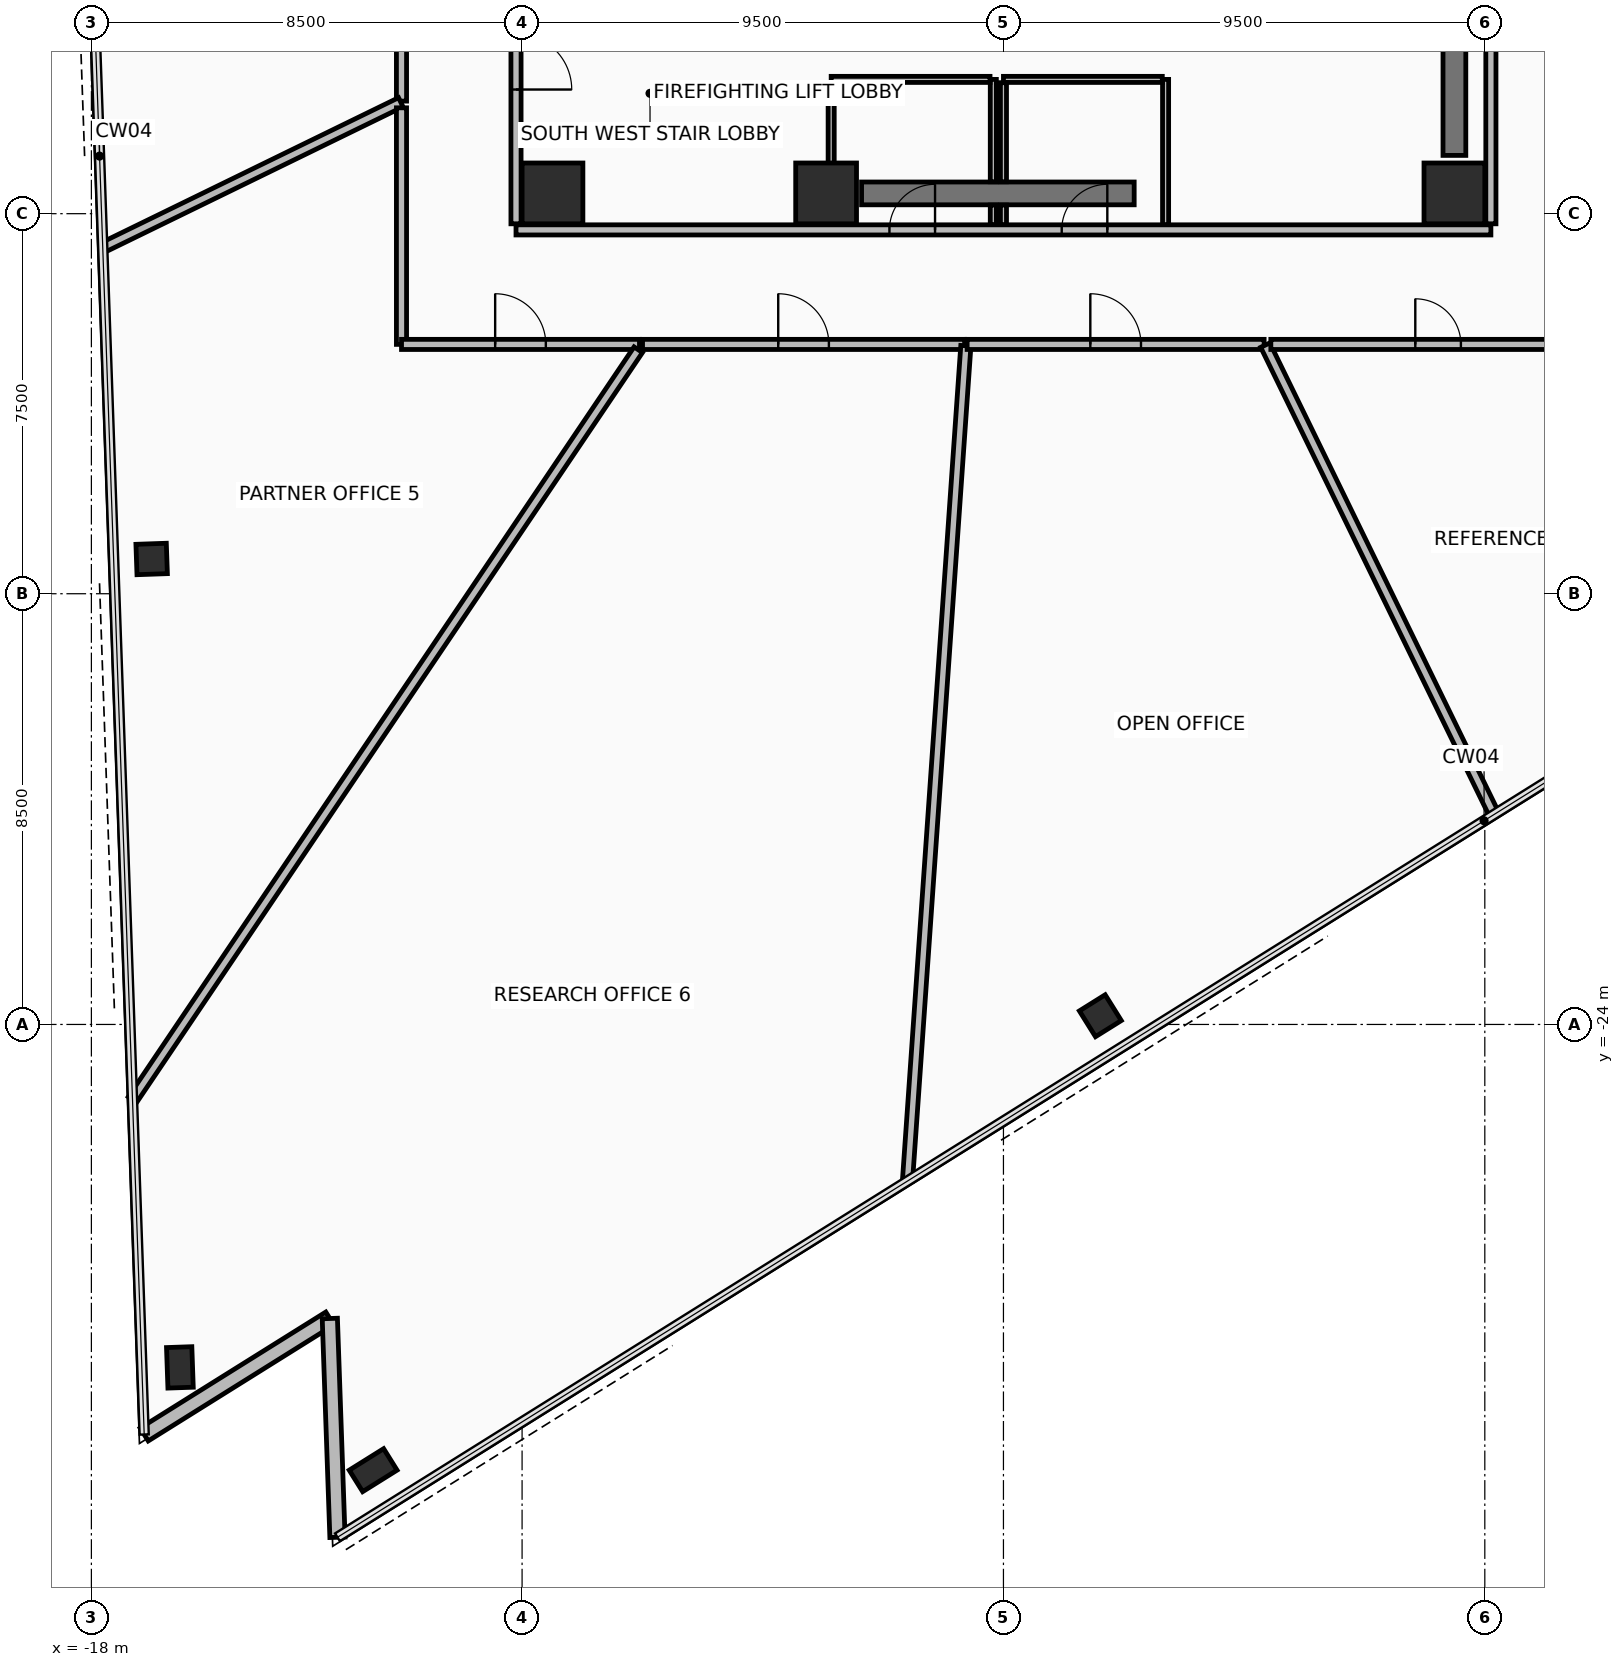
"""IFC4 building model, lengths in metres.
Left out: names, types, materials, properties, quantities, classifications, styles, units other than length and angle.
Written with IfcOpenShell. Run it as: python <this file> out.ifc"""

import sys

from ifc_helpers import new_model, si_unit, direction, frame, frame_2d, origin, origin_2d, place, context, subcontext, project, spatial, rectangle, hollow_rectangle, extrude, element, fill, save


model = new_model("IFC4")
c1 = context("Model", 3, precision=1e-05, world=origin(), true_north=direction((0.0, 1.0)))
c2 = subcontext(c1, "Body", "Model", "MODEL_VIEW")
j1 = project(units=[si_unit("LENGTHUNIT", "METRE"), si_unit("PLANEANGLEUNIT", "RADIAN")], contexts=[c1])
p1 = place(None, origin())
s1 = spatial("IfcSite", under=j1, at=p1, CompositionType="ELEMENT")
p2 = place(p1, origin())
s2 = spatial("IfcBuilding", under=s1, at=p2, CompositionType="ELEMENT")
p3 = place(p2, frame((0.0, 0.0, 149.6)))
s3 = spatial("IfcBuildingStorey", under=s2, at=p3, CompositionType="ELEMENT", Elevation=149.6)
for number, where, z_axis, x_axis in (
    (1, (-8.9, -7.6, 0.0), (0.0, 0.0, 1.0), (1.0, 0.0, 0.0)),
    (2, (-3.5, -7.6, 0.0), (0.0, 0.0, 1.0), (1.0, 0.0, 0.0)),
    (3, (8.9, -7.6, 0.0), (0.0, 0.0, 1.0), (1.0, 0.0, 0.0)),
):
    element("IfcColumn", number, at=place(p3, frame(where, z_axis=z_axis, x_axis=x_axis)), inside=s3, PredefinedType="COLUMN", context=c2, shape_type="SweptSolid", body=[
        extrude(rectangle(XDim=1.2, YDim=1.2, at=origin_2d()), origin(), (0.0, 0.0, 1.0), 3.6),
    ])
p4 = place(p3, frame((-16.811, -14.814, 0.0), z_axis=(0.0, 0.0, 1.0), x_axis=(-0.034899496703, 0.999390827019, 0.0)))
e4 = element("IfcColumn", 4, at=p4, inside=s3, PredefinedType="COLUMN", context=c2, shape_type="SweptSolid", body=[
    extrude(hollow_rectangle(XDim=0.6, YDim=0.6, WallThickness=0.036, at=origin_2d()), origin(), (0.0, 0.0, 1.0), 3.6),
])
for number, where, z_axis, x_axis in (
    (5, (-16.254, -30.768, 0.0), (0.0, 0.0, 1.0), (-0.035, 0.999, 0.0)),
    (6, (-12.439, -32.796, 0.0), (0.0, 0.0, 1.0), (0.848, 0.53, 0.0)),
):
    element("IfcColumn", number, at=place(p3, frame(where, z_axis=z_axis, x_axis=x_axis)), inside=s3, PredefinedType="COLUMN", context=c2, shape_type="SweptSolid", body=[
        extrude(hollow_rectangle(XDim=0.5, YDim=0.8, WallThickness=0.04, at=origin_2d()), origin(), (0.0, 0.0, 1.0), 3.6),
    ])
p5 = place(p3, frame((1.912, -23.828, 0.0), z_axis=(0.0, 0.0, 1.0), x_axis=(0.848047171272, 0.529920744356, 0.0)))
e7 = element("IfcColumn", 7, at=p5, inside=s3, PredefinedType="COLUMN", context=c2, shape_type="SweptSolid", body=[
    extrude(hollow_rectangle(XDim=0.6, YDim=0.6, WallThickness=0.036, at=origin_2d()), origin(), (0.0, 0.0, 1.0), 3.6),
])
p6 = place(p3, frame((-16.958, -32.092, 0.0), z_axis=(0.0, 0.0, 1.0), x_axis=(0.848068146975, 0.529887174866, 0.0)))
e8 = element("IfcWall", 8, at=p6, inside=s3, PredefinedType="STANDARD", context=c2, shape_type="SweptSolid", body=[
    extrude(rectangle(XDim=4.32, YDim=0.3, at=frame_2d((2.16, 0.0))), origin(), (0.0, 0.0, 1.0), 2.705),
])
p7 = place(p3, frame((-13.294, -29.803, 0.0), z_axis=(0.0, 0.0, 1.0), x_axis=(0.034869079132, -0.999391888761, 0.0)))
e9 = element("IfcWall", 9, at=p7, inside=s3, PredefinedType="STANDARD", context=c2, shape_type="SweptSolid", body=[
    extrude(rectangle(XDim=4.32, YDim=0.3, at=frame_2d((2.16, 0.0))), origin(), (0.0, 0.0, 1.0), 2.705),
])
p8 = place(p3, frame((-2.8, -7.6, 0.0), z_axis=(0.0, 0.0, 1.0), x_axis=(1.0, 0.0, 0.0)))
e10 = element("IfcWall", 10, at=p8, inside=s3, PredefinedType="SHEAR", context=c2, shape_type="SweptSolid", body=[
    extrude(rectangle(XDim=5.38, YDim=0.45, at=frame_2d((2.69, 0.0))), origin(), (0.0, 0.0, 1.0), 3.41),
])
p9 = place(p3, frame((8.9, -6.85, 0.0), z_axis=(0.0, 0.0, 1.0), x_axis=(0.0, 1.0, 0.0)))
e11 = element("IfcWall", 11, at=p9, inside=s3, PredefinedType="SHEAR", context=c2, shape_type="SweptSolid", body=[
    extrude(rectangle(XDim=10.7, YDim=0.45, at=frame_2d((5.35, 0.0))), origin(), (0.0, 0.0, 1.0), 3.41),
])
p10 = place(p3, frame((-9.62, -8.32, 0.0), z_axis=(0.0, 0.0, 1.0), x_axis=(1.0, 0.0, 0.0)))
e12 = element("IfcWall", 12, at=p10, inside=s3, PredefinedType="PARTITIONING", context=c2, shape_type="SweptSolid", body=[
    extrude(rectangle(XDim=19.24, YDim=0.2, at=frame_2d((9.62, 0.0))), origin(), (0.0, 0.0, 1.0), 2.855),
])
p11 = place(p10, frame((7.37, 0.0, 0.0)))
e13 = element("IfcOpeningElement", 13, at=p11, cuts=e12, PredefinedType="OPENING", context=c2, shape_type="SweptSolid", body=[
    extrude(rectangle(XDim=0.9, YDim=2.1, at=frame_2d((0.45, 1.05))), frame((0.0, 0.11, 0.0), z_axis=(0.0, -1.0, 0.0), x_axis=(1.0, 0.0, 0.0)), (0.0, 0.0, 1.0), 0.22),
])
p12 = place(p10, frame((10.77, 0.0, 0.0)))
e14 = element("IfcOpeningElement", 14, at=p12, cuts=e12, PredefinedType="OPENING", context=c2, shape_type="SweptSolid", body=[
    extrude(rectangle(XDim=0.9, YDim=2.1, at=frame_2d((0.45, 1.05))), frame((0.0, 0.11, 0.0), z_axis=(0.0, -1.0, 0.0), x_axis=(1.0, 0.0, 0.0)), (0.0, 0.0, 1.0), 0.22),
])
p13 = place(p3, frame((-9.62, 8.2, 0.0), z_axis=(0.0, 0.0, 1.0), x_axis=(0.0, -1.0, 0.0)))
e15 = element("IfcWall", 15, at=p13, inside=s3, PredefinedType="PARTITIONING", context=c2, shape_type="SweptSolid", body=[
    extrude(rectangle(XDim=16.4, YDim=0.2, at=frame_2d((8.2, 0.0))), origin(), (0.0, 0.0, 1.0), 2.855),
])
p14 = place(p13, frame((12.65, 0.0, 0.0)))
e16 = element("IfcOpeningElement", 16, at=p14, cuts=e15, PredefinedType="OPENING", context=c2, shape_type="SweptSolid", body=[
    extrude(rectangle(XDim=1.1, YDim=2.15, at=frame_2d((0.55, 1.075))), frame((0.0, 0.11, 0.0), z_axis=(0.0, -1.0, 0.0), x_axis=(1.0, 0.0, 0.0)), (0.0, 0.0, 1.0), 0.22),
])
p15 = place(p3, frame((9.62, -8.2, 0.0), z_axis=(0.0, 0.0, 1.0), x_axis=(0.0, 1.0, 0.0)))
e17 = element("IfcWall", 17, at=p15, inside=s3, PredefinedType="PARTITIONING", context=c2, shape_type="SweptSolid", body=[
    extrude(rectangle(XDim=16.4, YDim=0.2, at=frame_2d((8.2, 0.0))), origin(), (0.0, 0.0, 1.0), 2.855),
])
p16 = place(p15, frame((12.65, 0.0, 0.0)))
e18 = element("IfcOpeningElement", 18, at=p16, cuts=e17, PredefinedType="OPENING", context=c2, shape_type="SweptSolid", body=[
    extrude(rectangle(XDim=1.1, YDim=2.15, at=frame_2d((0.55, 1.075))), frame((0.0, 0.11, 0.0), z_axis=(0.0, -1.0, 0.0), x_axis=(1.0, 0.0, 0.0)), (0.0, 0.0, 1.0), 0.22),
])
p17 = place(p3, frame((-0.2, -8.215, 0.0), z_axis=(0.0, 0.0, 1.0), x_axis=(0.0, 1.0, 0.0)))
e19 = element("IfcWall", 19, at=p17, inside=s3, PredefinedType="PARTITIONING", context=c2, shape_type="SweptSolid", body=[
    extrude(rectangle(XDim=0.385, YDim=0.12, at=frame_2d((0.192, 0.0))), origin(), (0.0, 0.0, 1.0), 2.605),
])
p18 = place(p3, frame((-0.2, -7.37, 0.0), z_axis=(0.0, 0.0, 1.0), x_axis=(0.0, 1.0, 0.0)))
e20 = element("IfcWall", 20, at=p18, inside=s3, PredefinedType="PARTITIONING", context=c2, shape_type="SweptSolid", body=[
    extrude(rectangle(XDim=2.02, YDim=0.12, at=frame_2d((1.01, 0.0))), origin(), (0.0, 0.0, 1.0), 2.605),
])
p19 = place(p3, frame((-0.265, -5.35, 0.0), z_axis=(0.0, 0.0, 1.0), x_axis=(-1.0, 0.0, 0.0)))
e21 = element("IfcWall", 21, at=p19, inside=s3, PredefinedType="PARTITIONING", context=c2, shape_type="SweptSolid", body=[
    extrude(rectangle(XDim=3.135, YDim=0.12, at=frame_2d((1.567, 0.0))), origin(), (0.0, 0.0, 1.0), 2.605),
])
p20 = place(p3, frame((-3.4, -5.415, 0.0), z_axis=(0.0, 0.0, 1.0), x_axis=(0.0, -1.0, 0.0)))
e22 = element("IfcWall", 22, at=p20, inside=s3, PredefinedType="PARTITIONING", context=c2, shape_type="SweptSolid", body=[
    extrude(rectangle(XDim=2.8, YDim=0.12, at=frame_2d((1.4, 0.0))), origin(), (0.0, 0.0, 1.0), 2.605),
])
p21 = place(p3, frame((3.2, -8.215, 0.0), z_axis=(0.0, 0.0, 1.0), x_axis=(0.0, 1.0, 0.0)))
e23 = element("IfcWall", 23, at=p21, inside=s3, PredefinedType="PARTITIONING", context=c2, shape_type="SweptSolid", body=[
    extrude(rectangle(XDim=2.865, YDim=0.12, at=frame_2d((1.433, 0.0))), origin(), (0.0, 0.0, 1.0), 2.605),
])
p22 = place(p3, frame((3.135, -5.35, 0.0), z_axis=(0.0, 0.0, 1.0), x_axis=(-1.0, 0.0, 0.0)))
e24 = element("IfcWall", 24, at=p22, inside=s3, PredefinedType="PARTITIONING", context=c2, shape_type="SweptSolid", body=[
    extrude(rectangle(XDim=3.135, YDim=0.12, at=frame_2d((1.567, 0.0))), origin(), (0.0, 0.0, 1.0), 3.41),
])
p23 = place(p3, frame((0.0, -5.415, 0.0), z_axis=(0.0, 0.0, 1.0), x_axis=(0.0, -1.0, 0.0)))
e25 = element("IfcWall", 25, at=p23, inside=s3, PredefinedType="PARTITIONING", context=c2, shape_type="SweptSolid", body=[
    extrude(rectangle(XDim=1.955, YDim=0.12, at=frame_2d((0.978, 0.0))), origin(), (0.0, 0.0, 1.0), 2.605),
])
p24 = place(p3, frame((0.0, -7.83, 0.0), z_axis=(0.0, 0.0, 1.0), x_axis=(0.0, -1.0, 0.0)))
e26 = element("IfcWall", 26, at=p24, inside=s3, PredefinedType="PARTITIONING", context=c2, shape_type="SweptSolid", body=[
    extrude(rectangle(XDim=0.385, YDim=0.12, at=frame_2d((0.192, 0.0))), origin(), (0.0, 0.0, 1.0), 2.605),
])
p25 = place(p3, frame((-11.88, 0.807, 0.0), z_axis=(0.0, 0.0, 1.0), x_axis=(0.0, -1.0, 0.0)))
e27 = element("IfcWall", 27, at=p25, inside=s3, PredefinedType="PARTITIONING", context=c2, shape_type="SweptSolid", body=[
    extrude(rectangle(XDim=6.586, YDim=0.2, at=frame_2d((3.293, 0.0))), origin(), (0.0, 0.0, 1.0), 3.41),
])
p26 = place(p25, frame((2.793, 0.0, 0.0)))
e28 = element("IfcOpeningElement", 28, at=p26, cuts=e27, PredefinedType="OPENING", context=c2, shape_type="SweptSolid", body=[
    extrude(rectangle(XDim=1.0, YDim=2.15, at=frame_2d((0.5, 1.075))), frame((0.0, 0.11, 0.0), z_axis=(0.0, -1.0, 0.0), x_axis=(1.0, 0.0, 0.0)), (0.0, 0.0, 1.0), 0.22),
])
p27 = place(p3, frame((-11.894, -5.801, 0.0), z_axis=(0.0, 0.0, 1.0), x_axis=(-0.89877884349, -0.438402315796, 0.0)))
e29 = element("IfcWall", 29, at=p27, inside=s3, PredefinedType="PARTITIONING", context=c2, shape_type="SweptSolid", body=[
    extrude(rectangle(XDim=6.544, YDim=0.2, at=frame_2d((3.272, 0.0))), origin(), (0.0, 0.0, 1.0), 2.705),
])
p28 = place(p3, frame((-11.88, -5.911, 0.0), z_axis=(0.0, 0.0, 1.0), x_axis=(0.0, -1.0, 0.0)))
e30 = element("IfcWall", 30, at=p28, inside=s3, PredefinedType="PARTITIONING", context=c2, shape_type="SweptSolid", body=[
    extrude(rectangle(XDim=4.668, YDim=0.2, at=frame_2d((2.334, 0.0))), origin(), (0.0, 0.0, 1.0), 2.855),
])
p29 = place(p3, frame((-11.879, -10.58, 0.0), z_axis=(0.0, 0.0, 1.0), x_axis=(1.0, 0.0, 0.0)))
e31 = element("IfcWall", 31, at=p29, inside=s3, PredefinedType="PARTITIONING", context=c2, shape_type="SweptSolid", body=[
    extrude(rectangle(XDim=4.696, YDim=0.2, at=frame_2d((2.348, 0.0))), origin(), (0.0, 0.0, 1.0), 2.855),
])
p30 = place(p29, frame((1.848, 0.0, 0.0)))
e32 = element("IfcOpeningElement", 32, at=p30, cuts=e31, PredefinedType="OPENING", context=c2, shape_type="SweptSolid", body=[
    extrude(rectangle(XDim=1.0, YDim=2.15, at=frame_2d((0.5, 1.075))), frame((0.0, 0.11, 0.0), z_axis=(0.0, -1.0, 0.0), x_axis=(1.0, 0.0, 0.0)), (0.0, 0.0, 1.0), 0.22),
])
p31 = place(p3, frame((-7.207, -10.685, 0.0), z_axis=(0.0, 0.0, 1.0), x_axis=(-0.559208788391, -0.82902685782, 0.0)))
e33 = element("IfcWall", 33, at=p31, inside=s3, PredefinedType="PARTITIONING", context=c2, shape_type="SweptSolid", body=[
    extrude(rectangle(XDim=17.85, YDim=0.2, at=frame_2d((8.925, 0.0))), origin(), (0.0, 0.0, 1.0), 2.705),
])
p32 = place(p3, frame((-7.123, -10.58, 0.0), z_axis=(0.0, 0.0, 1.0), x_axis=(1.0, 0.0, 0.0)))
e34 = element("IfcWall", 34, at=p32, inside=s3, PredefinedType="PARTITIONING", context=c2, shape_type="SweptSolid", body=[
    extrude(rectangle(XDim=6.356, YDim=0.2, at=frame_2d((3.178, 0.0))), origin(), (0.0, 0.0, 1.0), 2.855),
])
p33 = place(p32, frame((2.678, 0.0, 0.0)))
e35 = element("IfcOpeningElement", 35, at=p33, cuts=e34, PredefinedType="OPENING", context=c2, shape_type="SweptSolid", body=[
    extrude(rectangle(XDim=1.0, YDim=2.15, at=frame_2d((0.5, 1.075))), frame((0.0, 0.11, 0.0), z_axis=(0.0, -1.0, 0.0), x_axis=(1.0, 0.0, 0.0)), (0.0, 0.0, 1.0), 0.22),
])
p34 = place(p3, frame((-0.742, -10.607, 0.0), z_axis=(0.0, 0.0, 1.0), x_axis=(-0.069759090617, -0.997563867267, 0.0)))
e36 = element("IfcWall", 36, at=p34, inside=s3, PredefinedType="PARTITIONING", context=c2, shape_type="SweptSolid", body=[
    extrude(rectangle(XDim=16.512, YDim=0.2, at=frame_2d((8.256, 0.0))), origin(), (0.0, 0.0, 1.0), 2.705),
])
p35 = place(p3, frame((-0.717, -10.58, 0.0), z_axis=(0.0, 0.0, 1.0), x_axis=(1.0, 0.0, 0.0)))
e37 = element("IfcWall", 37, at=p35, inside=s3, PredefinedType="PARTITIONING", context=c2, shape_type="SweptSolid", body=[
    extrude(rectangle(XDim=5.861, YDim=0.2, at=frame_2d((2.931, 0.0))), origin(), (0.0, 0.0, 1.0), 3.41),
])
p36 = place(p35, frame((2.431, 0.0, 0.0)))
e38 = element("IfcOpeningElement", 38, at=p36, cuts=e37, PredefinedType="OPENING", context=c2, shape_type="SweptSolid", body=[
    extrude(rectangle(XDim=1.0, YDim=2.15, at=frame_2d((0.5, 1.075))), frame((0.0, 0.11, 0.0), z_axis=(0.0, -1.0, 0.0), x_axis=(1.0, 0.0, 0.0)), (0.0, 0.0, 1.0), 0.22),
])
p37 = place(p3, frame((5.167, -10.594, 0.0), z_axis=(0.0, 0.0, 1.0), x_axis=(0.438378255041, -0.898790579338, 0.0)))
e39 = element("IfcWall", 39, at=p37, inside=s3, PredefinedType="PARTITIONING", context=c2, shape_type="SweptSolid", body=[
    extrude(rectangle(XDim=10.282, YDim=0.2, at=frame_2d((5.141, 0.0))), origin(), (0.0, 0.0, 1.0), 2.705),
])
p38 = place(p3, frame((5.277, -10.58, 0.0), z_axis=(0.0, 0.0, 1.0), x_axis=(1.0, 0.0, 0.0)))
e40 = element("IfcWall", 40, at=p38, inside=s3, PredefinedType="PARTITIONING", context=c2, shape_type="SweptSolid", body=[
    extrude(rectangle(XDim=6.602, YDim=0.2, at=frame_2d((3.301, 0.0))), origin(), (0.0, 0.0, 1.0), 2.855),
])
p39 = place(p38, frame((2.851, 0.0, 0.0)))
e41 = element("IfcOpeningElement", 41, at=p39, cuts=e40, PredefinedType="OPENING", context=c2, shape_type="SweptSolid", body=[
    extrude(rectangle(XDim=0.9, YDim=2.1, at=frame_2d((0.45, 1.05))), frame((0.0, 0.11, 0.0), z_axis=(0.0, -1.0, 0.0), x_axis=(1.0, 0.0, 0.0)), (0.0, 0.0, 1.0), 0.22),
])
p40 = place(p14, frame((1.1, 0.0, 0.0), z_axis=(0.0, 0.0, 1.0), x_axis=(-1.0, 0.0, 0.0)))
e42 = element("IfcDoor", 42, at=p40, inside=s3, OperationType="SINGLE_SWING_LEFT", PredefinedType="DOOR", context=c2, shape_type="SweptSolid", body=[
    extrude(rectangle(XDim=1.1, YDim=2.15, at=frame_2d((0.55, 1.075))), frame((0.0, 0.025, 0.0), z_axis=(0.0, -1.0, 0.0), x_axis=(1.0, 0.0, 0.0)), (0.0, 0.0, 1.0), 0.05),
])
fill(e16, e42)
p41 = place(p11, frame((0.9, 0.0, 0.0), z_axis=(0.0, 0.0, 1.0), x_axis=(-1.0, 0.0, 0.0)))
e43 = element("IfcDoor", 43, at=p41, inside=s3, OperationType="SINGLE_SWING_LEFT", PredefinedType="DOOR", context=c2, shape_type="SweptSolid", body=[
    extrude(rectangle(XDim=0.9, YDim=2.1, at=frame_2d((0.45, 1.05))), frame((0.0, 0.025, 0.0), z_axis=(0.0, -1.0, 0.0), x_axis=(1.0, 0.0, 0.0)), (0.0, 0.0, 1.0), 0.05),
])
fill(e13, e43)
p42 = place(p12, frame((0.9, 0.0, 0.0), z_axis=(0.0, 0.0, 1.0), x_axis=(-1.0, 0.0, 0.0)))
e44 = element("IfcDoor", 44, at=p42, inside=s3, OperationType="SINGLE_SWING_LEFT", PredefinedType="DOOR", context=c2, shape_type="SweptSolid", body=[
    extrude(rectangle(XDim=0.9, YDim=2.1, at=frame_2d((0.45, 1.05))), frame((0.0, 0.025, 0.0), z_axis=(0.0, -1.0, 0.0), x_axis=(1.0, 0.0, 0.0)), (0.0, 0.0, 1.0), 0.05),
])
fill(e14, e44)
p43 = place(p30, origin())
e45 = element("IfcDoor", 45, at=p43, inside=s3, OperationType="SINGLE_SWING_RIGHT", PredefinedType="DOOR", context=c2, shape_type="SweptSolid", body=[
    extrude(rectangle(XDim=1.0, YDim=2.15, at=frame_2d((0.5, 1.075))), frame((0.0, 0.025, 0.0), z_axis=(0.0, -1.0, 0.0), x_axis=(1.0, 0.0, 0.0)), (0.0, 0.0, 1.0), 0.05),
])
fill(e32, e45)
p44 = place(p33, origin())
e46 = element("IfcDoor", 46, at=p44, inside=s3, OperationType="SINGLE_SWING_RIGHT", PredefinedType="DOOR", context=c2, shape_type="SweptSolid", body=[
    extrude(rectangle(XDim=1.0, YDim=2.15, at=frame_2d((0.5, 1.075))), frame((0.0, 0.025, 0.0), z_axis=(0.0, -1.0, 0.0), x_axis=(1.0, 0.0, 0.0)), (0.0, 0.0, 1.0), 0.05),
])
fill(e35, e46)
p45 = place(p36, origin())
e47 = element("IfcDoor", 47, at=p45, inside=s3, OperationType="SINGLE_SWING_RIGHT", PredefinedType="DOOR", context=c2, shape_type="SweptSolid", body=[
    extrude(rectangle(XDim=1.0, YDim=2.15, at=frame_2d((0.5, 1.075))), frame((0.0, 0.025, 0.0), z_axis=(0.0, -1.0, 0.0), x_axis=(1.0, 0.0, 0.0)), (0.0, 0.0, 1.0), 0.05),
])
fill(e38, e47)
p46 = place(p39, origin())
e48 = element("IfcDoor", 48, at=p46, inside=s3, OperationType="SINGLE_SWING_LEFT", PredefinedType="DOOR", context=c2, shape_type="SweptSolid", body=[
    extrude(rectangle(XDim=0.9, YDim=2.1, at=frame_2d((0.45, 1.05))), frame((0.0, 0.025, 0.0), z_axis=(0.0, -1.0, 0.0), x_axis=(1.0, 0.0, 0.0)), (0.0, 0.0, 1.0), 0.05),
])
fill(e41, e48)
save(model, sys.argv[1])
